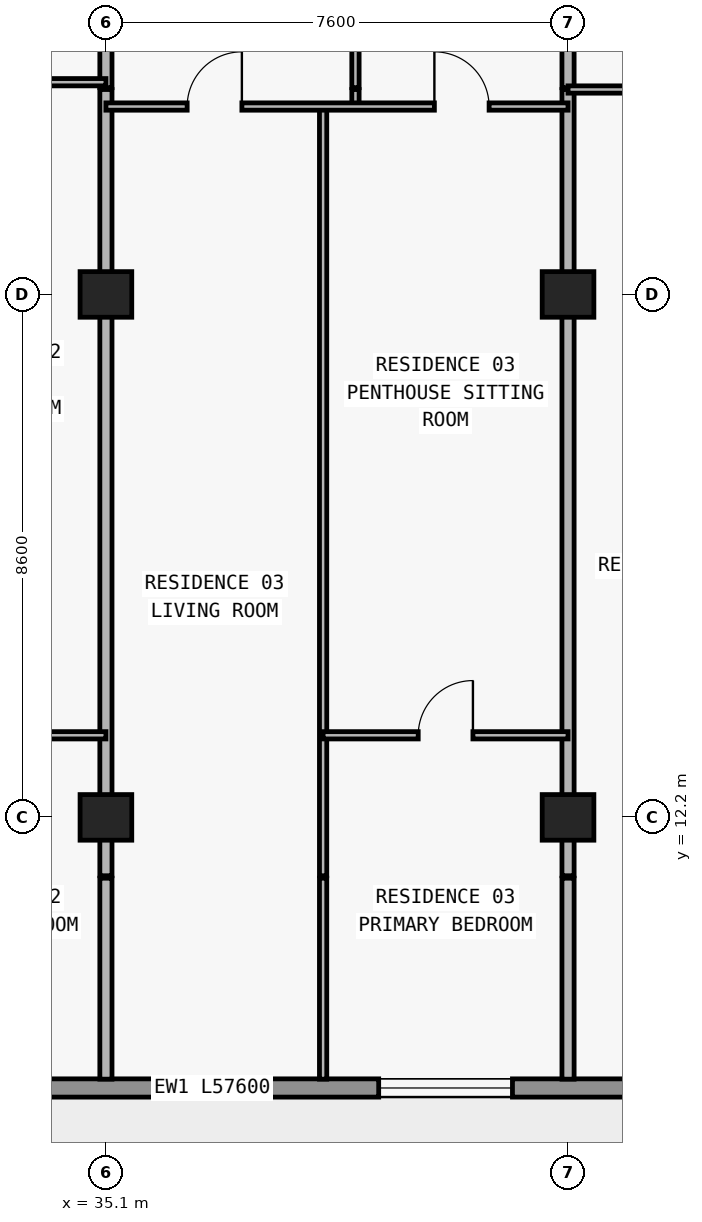
"""IFC4 building model, lengths in metres.
Left out: names, types, materials, properties, quantities, classifications, styles, units other than length and angle.
Written with IfcOpenShell. Run it as: python <this file> out.ifc"""

import sys

from ifc_helpers import new_model, si_unit, direction, frame, frame_2d, origin, origin_2d, place, context, subcontext, project, spatial, rectangle, extrude, element, fill, save


model = new_model("IFC4")
c1 = context("Model", 3, precision=1e-05, world=origin(), true_north=direction((0.0, 1.0)))
c2 = subcontext(c1, "Body", "Model", "MODEL_VIEW")
j1 = project(units=[si_unit("LENGTHUNIT", "METRE"), si_unit("PLANEANGLEUNIT", "RADIAN")], contexts=[c1])
p1 = place(None, origin())
s1 = spatial("IfcSite", under=j1, at=p1, CompositionType="ELEMENT")
p2 = place(p1, origin())
s2 = spatial("IfcBuilding", under=s1, at=p2, CompositionType="ELEMENT")
p3 = place(p2, frame((0.0, 0.0, 167.1)))
s3 = spatial("IfcBuildingStorey", under=s2, at=p3, CompositionType="ELEMENT", Elevation=167.1)
for number, where, z_axis, x_axis in (
    (1, (35.1, 12.2, 0.0), (0.0, 0.0, 1.0), (1.0, 0.0, 0.0)),
    (2, (42.7, 12.2, 0.0), (0.0, 0.0, 1.0), (1.0, 0.0, 0.0)),
    (3, (35.1, 20.8, 0.0), (0.0, 0.0, 1.0), (1.0, 0.0, 0.0)),
    (4, (42.7, 20.8, 0.0), (0.0, 0.0, 1.0), (1.0, 0.0, 0.0)),
):
    element("IfcColumn", number, at=place(p3, frame(where, z_axis=z_axis, x_axis=x_axis)), inside=s3, PredefinedType="COLUMN", context=c2, shape_type="SweptSolid", body=[
        extrude(rectangle(XDim=0.85, YDim=0.75, at=origin_2d()), origin(), (0.0, 0.0, 1.0), 3.05),
    ])
p4 = place(p3, frame((67.7, 7.75, 0.0), z_axis=(0.0, 0.0, 1.0), x_axis=(-1.0, 0.0, 0.0)))
e5 = element("IfcWall", 5, at=p4, inside=s3, PredefinedType="STANDARD", context=c2, shape_type="SweptSolid", body=[
    extrude(rectangle(XDim=57.6, YDim=0.3, at=frame_2d((28.8, 0.0))), origin(), (0.0, 0.0, 1.0), 3.05),
])
p5 = place(p4, frame((54.69, 0.0, 0.0)))
e6 = element("IfcOpeningElement", 6, at=p5, cuts=e5, PredefinedType="OPENING", context=c2, shape_type="SweptSolid", body=[
    extrude(rectangle(XDim=2.0, YDim=2.3, at=frame_2d((1.0, 1.15))), frame((0.0, 0.16, 0.0), z_axis=(0.0, -1.0, 0.0), x_axis=(1.0, 0.0, 0.0)), (0.0, 0.0, 1.0), 0.32),
])
p6 = place(p4, frame((50.21, 0.0, 0.65)))
e7 = element("IfcOpeningElement", 7, at=p6, cuts=e5, PredefinedType="OPENING", context=c2, shape_type="SweptSolid", body=[
    extrude(rectangle(XDim=2.6, YDim=1.85, at=frame_2d((1.3, 0.925))), frame((0.0, 0.16, 0.0), z_axis=(0.0, -1.0, 0.0), x_axis=(1.0, 0.0, 0.0)), (0.0, 0.0, 1.0), 0.32),
])
p7 = place(p4, frame((44.1, 0.0, 0.85)))
e8 = element("IfcOpeningElement", 8, at=p7, cuts=e5, PredefinedType="OPENING", context=c2, shape_type="SweptSolid", body=[
    extrude(rectangle(XDim=2.2, YDim=1.55, at=frame_2d((1.1, 0.775))), frame((0.0, 0.16, 0.0), z_axis=(0.0, -1.0, 0.0), x_axis=(1.0, 0.0, 0.0)), (0.0, 0.0, 1.0), 0.32),
])
p8 = place(p4, frame((37.69, 0.0, 0.0)))
e9 = element("IfcOpeningElement", 9, at=p8, cuts=e5, PredefinedType="OPENING", context=c2, shape_type="SweptSolid", body=[
    extrude(rectangle(XDim=2.0, YDim=2.3, at=frame_2d((1.0, 1.15))), frame((0.0, 0.16, 0.0), z_axis=(0.0, -1.0, 0.0), x_axis=(1.0, 0.0, 0.0)), (0.0, 0.0, 1.0), 0.32),
])
p9 = place(p4, frame((33.59, 0.0, 0.85)))
e10 = element("IfcOpeningElement", 10, at=p9, cuts=e5, PredefinedType="OPENING", context=c2, shape_type="SweptSolid", body=[
    extrude(rectangle(XDim=1.8, YDim=1.55, at=frame_2d((0.9, 0.775))), frame((0.0, 0.16, 0.0), z_axis=(0.0, -1.0, 0.0), x_axis=(1.0, 0.0, 0.0)), (0.0, 0.0, 1.0), 0.32),
])
p10 = place(p4, frame((25.914, 0.0, 0.85)))
e11 = element("IfcOpeningElement", 11, at=p10, cuts=e5, PredefinedType="OPENING", context=c2, shape_type="SweptSolid", body=[
    extrude(rectangle(XDim=2.2, YDim=1.55, at=frame_2d((1.1, 0.775))), frame((0.0, 0.16, 0.0), z_axis=(0.0, -1.0, 0.0), x_axis=(1.0, 0.0, 0.0)), (0.0, 0.0, 1.0), 0.32),
])
p11 = place(p4, frame((21.69, 0.0, 0.0)))
e12 = element("IfcOpeningElement", 12, at=p11, cuts=e5, PredefinedType="OPENING", context=c2, shape_type="SweptSolid", body=[
    extrude(rectangle(XDim=2.0, YDim=2.3, at=frame_2d((1.0, 1.15))), frame((0.0, 0.16, 0.0), z_axis=(0.0, -1.0, 0.0), x_axis=(1.0, 0.0, 0.0)), (0.0, 0.0, 1.0), 0.32),
])
p12 = place(p4, frame((17.59, 0.0, 0.85)))
e13 = element("IfcOpeningElement", 13, at=p12, cuts=e5, PredefinedType="OPENING", context=c2, shape_type="SweptSolid", body=[
    extrude(rectangle(XDim=1.8, YDim=1.55, at=frame_2d((0.9, 0.775))), frame((0.0, 0.16, 0.0), z_axis=(0.0, -1.0, 0.0), x_axis=(1.0, 0.0, 0.0)), (0.0, 0.0, 1.0), 0.32),
])
p13 = place(p4, frame((13.69, 0.0, 0.0)))
e14 = element("IfcOpeningElement", 14, at=p13, cuts=e5, PredefinedType="OPENING", context=c2, shape_type="SweptSolid", body=[
    extrude(rectangle(XDim=2.0, YDim=2.3, at=frame_2d((1.0, 1.15))), frame((0.0, 0.16, 0.0), z_axis=(0.0, -1.0, 0.0), x_axis=(1.0, 0.0, 0.0)), (0.0, 0.0, 1.0), 0.32),
])
p14 = place(p4, frame((9.01, 0.0, 0.65)))
e15 = element("IfcOpeningElement", 15, at=p14, cuts=e5, PredefinedType="OPENING", context=c2, shape_type="SweptSolid", body=[
    extrude(rectangle(XDim=2.6, YDim=1.85, at=frame_2d((1.3, 0.925))), frame((0.0, 0.16, 0.0), z_axis=(0.0, -1.0, 0.0), x_axis=(1.0, 0.0, 0.0)), (0.0, 0.0, 1.0), 0.32),
])
p15 = place(p4, frame((3.0, 0.0, 0.85)))
e16 = element("IfcOpeningElement", 16, at=p15, cuts=e5, PredefinedType="OPENING", context=c2, shape_type="SweptSolid", body=[
    extrude(rectangle(XDim=2.2, YDim=1.55, at=frame_2d((1.1, 0.775))), frame((0.0, 0.16, 0.0), z_axis=(0.0, -1.0, 0.0), x_axis=(1.0, 0.0, 0.0)), (0.0, 0.0, 1.0), 0.32),
])
p16 = place(p3, frame((35.1, 7.895, 0.0), z_axis=(0.0, 0.0, 1.0), x_axis=(0.0, 1.0, 0.0)))
e17 = element("IfcWall", 17, at=p16, inside=s3, PredefinedType="PARTITIONING", context=c2, shape_type="SweptSolid", body=[
    extrude(rectangle(XDim=3.305, YDim=0.2, at=frame_2d((1.652, 0.0))), origin(), (0.0, 0.0, 1.0), 3.05),
])
p17 = place(p3, frame((35.1, 11.24, 0.0), z_axis=(0.0, 0.0, 1.0), x_axis=(0.0, 1.0, 0.0)))
e18 = element("IfcWall", 18, at=p17, inside=s3, PredefinedType="PARTITIONING", context=c2, shape_type="SweptSolid", body=[
    extrude(rectangle(XDim=12.93, YDim=0.2, at=frame_2d((6.465, 0.0))), origin(), (0.0, 0.0, 1.0), 2.263),
])
p18 = place(p3, frame((35.1, 24.2, 0.0), z_axis=(0.0, 0.0, 1.0), x_axis=(0.0, 1.0, 0.0)))
e19 = element("IfcWall", 19, at=p18, inside=s3, PredefinedType="PARTITIONING", context=c2, shape_type="SweptSolid", body=[
    extrude(rectangle(XDim=4.84, YDim=0.2, at=frame_2d((2.42, 0.0))), origin(), (0.0, 0.0, 1.0), 2.263),
])
p19 = place(p3, frame((38.672, 7.895, 0.0), z_axis=(0.0, 0.0, 1.0), x_axis=(0.0, 1.0, 0.0)))
e20 = element("IfcWall", 20, at=p19, inside=s3, PredefinedType="PARTITIONING", context=c2, shape_type="SweptSolid", body=[
    extrude(rectangle(XDim=3.305, YDim=0.12, at=frame_2d((1.652, 0.0))), origin(), (0.0, 0.0, 1.0), 3.05),
])
p20 = place(p3, frame((38.672, 11.24, 0.0), z_axis=(0.0, 0.0, 1.0), x_axis=(0.0, 1.0, 0.0)))
e21 = element("IfcWall", 21, at=p20, inside=s3, PredefinedType="PARTITIONING", context=c2, shape_type="SweptSolid", body=[
    extrude(rectangle(XDim=12.65, YDim=0.12, at=frame_2d((6.325, 0.0))), origin(), (0.0, 0.0, 1.0), 3.05),
])
p21 = place(p3, frame((39.204, 23.89, 0.0), z_axis=(0.0, 0.0, 1.0), x_axis=(0.0, 1.0, 0.0)))
e22 = element("IfcWall", 22, at=p21, inside=s3, PredefinedType="PARTITIONING", context=c2, shape_type="SweptSolid", body=[
    extrude(rectangle(XDim=0.28, YDim=0.12, at=frame_2d((0.14, 0.0))), origin(), (0.0, 0.0, 1.0), 3.05),
])
p22 = place(p3, frame((39.204, 24.2, 0.0), z_axis=(0.0, 0.0, 1.0), x_axis=(0.0, 1.0, 0.0)))
e23 = element("IfcWall", 23, at=p22, inside=s3, PredefinedType="PARTITIONING", context=c2, shape_type="SweptSolid", body=[
    extrude(rectangle(XDim=4.84, YDim=0.12, at=frame_2d((2.42, 0.0))), origin(), (0.0, 0.0, 1.0), 3.05),
])
p23 = place(p22, frame((1.97, 0.0, 0.0)))
e24 = element("IfcOpeningElement", 24, at=p23, cuts=e23, PredefinedType="OPENING", context=c2, shape_type="SweptSolid", body=[
    extrude(rectangle(XDim=0.9, YDim=2.15, at=frame_2d((0.45, 1.075))), frame((0.0, 0.07, 0.0), z_axis=(0.0, -1.0, 0.0), x_axis=(1.0, 0.0, 0.0)), (0.0, 0.0, 1.0), 0.14),
])
p24 = place(p3, frame((42.7, 7.895, 0.0), z_axis=(0.0, 0.0, 1.0), x_axis=(0.0, 1.0, 0.0)))
e25 = element("IfcWall", 25, at=p24, inside=s3, PredefinedType="PARTITIONING", context=c2, shape_type="SweptSolid", body=[
    extrude(rectangle(XDim=3.305, YDim=0.2, at=frame_2d((1.652, 0.0))), origin(), (0.0, 0.0, 1.0), 3.05),
])
p25 = place(p3, frame((42.7, 11.24, 0.0), z_axis=(0.0, 0.0, 1.0), x_axis=(0.0, 1.0, 0.0)))
e26 = element("IfcWall", 26, at=p25, inside=s3, PredefinedType="PARTITIONING", context=c2, shape_type="SweptSolid", body=[
    extrude(rectangle(XDim=12.93, YDim=0.2, at=frame_2d((6.465, 0.0))), origin(), (0.0, 0.0, 1.0), 2.263),
])
p26 = place(p3, frame((42.7, 24.2, 0.0), z_axis=(0.0, 0.0, 1.0), x_axis=(0.0, 1.0, 0.0)))
e27 = element("IfcWall", 27, at=p26, inside=s3, PredefinedType="PARTITIONING", context=c2, shape_type="SweptSolid", body=[
    extrude(rectangle(XDim=4.84, YDim=0.2, at=frame_2d((2.42, 0.0))), origin(), (0.0, 0.0, 1.0), 2.263),
])
p27 = place(p3, frame((31.4, 13.55, 0.0), z_axis=(0.0, 0.0, 1.0), x_axis=(1.0, 0.0, 0.0)))
e28 = element("IfcWall", 28, at=p27, inside=s3, PredefinedType="PARTITIONING", context=c2, shape_type="SweptSolid", body=[
    extrude(rectangle(XDim=3.7, YDim=0.12, at=frame_2d((1.85, 0.0))), origin(), (0.0, 0.0, 1.0), 3.05),
])
p28 = place(p27, frame((1.4, 0.0, 0.0)))
e29 = element("IfcOpeningElement", 29, at=p28, cuts=e28, PredefinedType="OPENING", context=c2, shape_type="SweptSolid", body=[
    extrude(rectangle(XDim=0.9, YDim=2.15, at=frame_2d((0.45, 1.075))), frame((0.0, 0.07, 0.0), z_axis=(0.0, -1.0, 0.0), x_axis=(1.0, 0.0, 0.0)), (0.0, 0.0, 1.0), 0.14),
])
p29 = place(p3, frame((38.672, 13.55, 0.0), z_axis=(0.0, 0.0, 1.0), x_axis=(1.0, 0.0, 0.0)))
e30 = element("IfcWall", 30, at=p29, inside=s3, PredefinedType="PARTITIONING", context=c2, shape_type="SweptSolid", body=[
    extrude(rectangle(XDim=4.028, YDim=0.12, at=frame_2d((2.014, 0.0))), origin(), (0.0, 0.0, 1.0), 3.05),
])
p30 = place(p29, frame((1.564, 0.0, 0.0)))
e31 = element("IfcOpeningElement", 31, at=p30, cuts=e30, PredefinedType="OPENING", context=c2, shape_type="SweptSolid", body=[
    extrude(rectangle(XDim=0.9, YDim=2.15, at=frame_2d((0.45, 1.075))), frame((0.0, 0.07, 0.0), z_axis=(0.0, -1.0, 0.0), x_axis=(1.0, 0.0, 0.0)), (0.0, 0.0, 1.0), 0.14),
])
p31 = place(p3, frame((35.1, 23.89, 0.0), z_axis=(0.0, 0.0, 1.0), x_axis=(1.0, 0.0, 0.0)))
e32 = element("IfcWall", 32, at=p31, inside=s3, PredefinedType="PARTITIONING", context=c2, shape_type="SweptSolid", body=[
    extrude(rectangle(XDim=7.6, YDim=0.12, at=frame_2d((3.8, 0.0))), origin(), (0.0, 0.0, 1.0), 3.05),
])
p32 = place(p31, frame((1.336, 0.0, 0.0)))
e33 = element("IfcOpeningElement", 33, at=p32, cuts=e32, PredefinedType="OPENING", context=c2, shape_type="SweptSolid", body=[
    extrude(rectangle(XDim=0.9, YDim=2.15, at=frame_2d((0.45, 1.075))), frame((0.0, 0.07, 0.0), z_axis=(0.0, -1.0, 0.0), x_axis=(1.0, 0.0, 0.0)), (0.0, 0.0, 1.0), 0.14),
])
p33 = place(p31, frame((5.402, 0.0, 0.0)))
e34 = element("IfcOpeningElement", 34, at=p33, cuts=e32, PredefinedType="OPENING", context=c2, shape_type="SweptSolid", body=[
    extrude(rectangle(XDim=0.9, YDim=2.15, at=frame_2d((0.45, 1.075))), frame((0.0, 0.07, 0.0), z_axis=(0.0, -1.0, 0.0), x_axis=(1.0, 0.0, 0.0)), (0.0, 0.0, 1.0), 0.14),
])
p34 = place(p3, frame((42.7, 24.17, 0.0), z_axis=(0.0, 0.0, 1.0), x_axis=(1.0, 0.0, 0.0)))
e35 = element("IfcWall", 35, at=p34, inside=s3, PredefinedType="PARTITIONING", context=c2, shape_type="SweptSolid", body=[
    extrude(rectangle(XDim=8.18, YDim=0.12, at=frame_2d((4.09, 0.0))), origin(), (0.0, 0.0, 1.0), 3.05),
])
p35 = place(p34, frame((1.86, 0.0, 0.0)))
e36 = element("IfcOpeningElement", 36, at=p35, cuts=e35, PredefinedType="OPENING", context=c2, shape_type="SweptSolid", body=[
    extrude(rectangle(XDim=0.9, YDim=2.15, at=frame_2d((0.45, 1.075))), frame((0.0, 0.07, 0.0), z_axis=(0.0, -1.0, 0.0), x_axis=(1.0, 0.0, 0.0)), (0.0, 0.0, 1.0), 0.14),
])
p36 = place(p34, frame((6.033, 0.0, 0.0)))
e37 = element("IfcOpeningElement", 37, at=p36, cuts=e35, PredefinedType="OPENING", context=c2, shape_type="SweptSolid", body=[
    extrude(rectangle(XDim=0.9, YDim=2.15, at=frame_2d((0.45, 1.075))), frame((0.0, 0.07, 0.0), z_axis=(0.0, -1.0, 0.0), x_axis=(1.0, 0.0, 0.0)), (0.0, 0.0, 1.0), 0.14),
])
p37 = place(p3, frame((31.4, 24.29, 0.0), z_axis=(0.0, 0.0, 1.0), x_axis=(1.0, 0.0, 0.0)))
e38 = element("IfcWall", 38, at=p37, inside=s3, PredefinedType="PARTITIONING", context=c2, shape_type="SweptSolid", body=[
    extrude(rectangle(XDim=3.7, YDim=0.12, at=frame_2d((1.85, 0.0))), origin(), (0.0, 0.0, 1.0), 3.05),
])
p38 = place(p37, frame((1.4, 0.0, 0.0)))
e39 = element("IfcOpeningElement", 39, at=p38, cuts=e38, PredefinedType="OPENING", context=c2, shape_type="SweptSolid", body=[
    extrude(rectangle(XDim=0.9, YDim=2.15, at=frame_2d((0.45, 1.075))), frame((0.0, 0.07, 0.0), z_axis=(0.0, -1.0, 0.0), x_axis=(1.0, 0.0, 0.0)), (0.0, 0.0, 1.0), 0.14),
])
p39 = place(p10, origin())
e40 = element("IfcWindow", 40, at=p39, inside=s3, PartitioningType="SINGLE_PANEL", PredefinedType="WINDOW", context=c2, shape_type="SweptSolid", body=[
    extrude(rectangle(XDim=2.2, YDim=1.55, at=frame_2d((1.1, 0.775))), frame((0.0, 0.03, 0.0), z_axis=(0.0, -1.0, 0.0), x_axis=(1.0, 0.0, 0.0)), (0.0, 0.0, 1.0), 0.06),
])
fill(e11, e40)
p40 = place(p32, origin())
e41 = element("IfcDoor", 41, at=p40, inside=s3, OperationType="SINGLE_SWING_RIGHT", PredefinedType="DOOR", context=c2, shape_type="SweptSolid", body=[
    extrude(rectangle(XDim=0.9, YDim=2.15, at=frame_2d((0.45, 1.075))), frame((0.0, 0.025, 0.0), z_axis=(0.0, -1.0, 0.0), x_axis=(1.0, 0.0, 0.0)), (0.0, 0.0, 1.0), 0.05),
])
fill(e33, e41)
p41 = place(p33, origin())
e42 = element("IfcDoor", 42, at=p41, inside=s3, OperationType="SINGLE_SWING_LEFT", PredefinedType="DOOR", context=c2, shape_type="SweptSolid", body=[
    extrude(rectangle(XDim=0.9, YDim=2.15, at=frame_2d((0.45, 1.075))), frame((0.0, 0.025, 0.0), z_axis=(0.0, -1.0, 0.0), x_axis=(1.0, 0.0, 0.0)), (0.0, 0.0, 1.0), 0.05),
])
fill(e34, e42)
p42 = place(p30, origin())
e43 = element("IfcDoor", 43, at=p42, inside=s3, OperationType="SINGLE_SWING_RIGHT", PredefinedType="DOOR", context=c2, shape_type="SweptSolid", body=[
    extrude(rectangle(XDim=0.9, YDim=2.15, at=frame_2d((0.45, 1.075))), frame((0.0, 0.025, 0.0), z_axis=(0.0, -1.0, 0.0), x_axis=(1.0, 0.0, 0.0)), (0.0, 0.0, 1.0), 0.05),
])
fill(e31, e43)
save(model, sys.argv[1])
